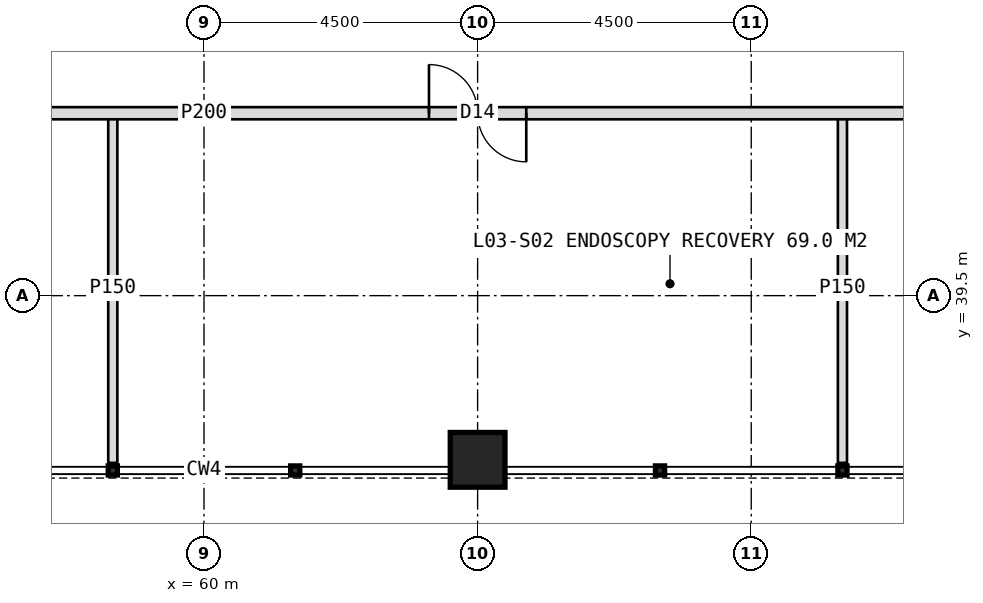
"""IFC4 building model, lengths in metres.
Left out: names, types, materials, properties, quantities, classifications, styles, units other than length and angle.
Written with IfcOpenShell. Run it as: python <this file> out.ifc"""

import sys

from ifc_helpers import new_model, si_unit, direction, frame, frame_2d, origin, origin_2d, place, context, subcontext, project, spatial, rectangle, hollow_rectangle, extrude, element, fill, save


model = new_model("IFC4")
c1 = context("Model", 3, precision=1e-05, world=origin(), true_north=direction((0.0, 1.0)))
c2 = subcontext(c1, "Body", "Model", "MODEL_VIEW")
j1 = project(units=[si_unit("LENGTHUNIT", "METRE"), si_unit("PLANEANGLEUNIT", "RADIAN")], contexts=[c1])
p1 = place(None, origin())
s1 = spatial("IfcSite", under=j1, at=p1, CompositionType="ELEMENT")
p2 = place(p1, origin())
s2 = spatial("IfcBuilding", under=s1, at=p2, CompositionType="ELEMENT")
p3 = place(p2, frame((0.0, 0.0, 16.5)))
s3 = spatial("IfcBuildingStorey", under=s2, at=p3, CompositionType="ELEMENT", Elevation=16.5)
p4 = place(p3, frame((64.5, 36.8, 0.0), z_axis=(0.0, 0.0, 1.0), x_axis=(1.0, 0.0, 0.0)))
e1 = element("IfcColumn", 1, at=p4, inside=s3, PredefinedType="COLUMN", context=c2, shape_type="SweptSolid", body=[
    extrude(hollow_rectangle(XDim=0.9, YDim=0.9, WallThickness=0.08, at=origin_2d()), origin(), (0.0, 0.0, 1.0), 4.5),
])
for number, where, z_axis, x_axis in (
    (2, (70.5, 42.5, 0.0), (0.0, 0.0, 1.0), (0.0, -1.0, 0.0)),
    (3, (58.5, 42.5, 0.0), (0.0, 0.0, 1.0), (0.0, -1.0, 0.0)),
):
    element("IfcWall", number, at=place(p3, frame(where, z_axis=z_axis, x_axis=x_axis)), inside=s3, PredefinedType="PARTITIONING", context=c2, shape_type="SweptSolid", body=[
        extrude(rectangle(XDim=5.75, YDim=0.15, at=frame_2d((2.875, 0.0))), origin(), (0.0, 0.0, 1.0), 4.2),
    ])
p5 = place(p3, frame((79.5, 42.5, 0.0), z_axis=(0.0, 0.0, 1.0), x_axis=(-1.0, 0.0, 0.0)))
e4 = element("IfcWall", 4, at=p5, inside=s3, PredefinedType="PARTITIONING", context=c2, shape_type="SweptSolid", body=[
    extrude(rectangle(XDim=39.0, YDim=0.2, at=frame_2d((19.5, 0.0))), origin(), (0.0, 0.0, 1.0), 4.2),
])
p6 = place(p5, frame((4.0, 0.0, 0.0)))
e5 = element("IfcOpeningElement", 5, at=p6, cuts=e4, PredefinedType="OPENING", context=c2, shape_type="SweptSolid", body=[
    extrude(rectangle(XDim=1.0, YDim=2.1, at=frame_2d((0.5, 1.05))), frame((0.0, 0.11, 0.0), z_axis=(0.0, -1.0, 0.0), x_axis=(1.0, 0.0, 0.0)), (0.0, 0.0, 1.0), 0.22),
])
p7 = place(p5, frame((14.2, 0.0, 0.0)))
e6 = element("IfcOpeningElement", 6, at=p7, cuts=e4, PredefinedType="OPENING", context=c2, shape_type="SweptSolid", body=[
    extrude(rectangle(XDim=1.6, YDim=2.2, at=frame_2d((0.8, 1.1))), frame((0.0, 0.11, 0.0), z_axis=(0.0, -1.0, 0.0), x_axis=(1.0, 0.0, 0.0)), (0.0, 0.0, 1.0), 0.22),
])
p8 = place(p5, frame((29.2, 0.0, 0.0)))
e7 = element("IfcOpeningElement", 7, at=p8, cuts=e4, PredefinedType="OPENING", context=c2, shape_type="SweptSolid", body=[
    extrude(rectangle(XDim=1.6, YDim=2.2, at=frame_2d((0.8, 1.1))), frame((0.0, 0.11, 0.0), z_axis=(0.0, -1.0, 0.0), x_axis=(1.0, 0.0, 0.0)), (0.0, 0.0, 1.0), 0.22),
])
p9 = place(p7, origin())
e8 = element("IfcDoor", 8, at=p9, inside=s3, OperationType="DOUBLE_DOOR_DOUBLE_SWING", PredefinedType="DOOR", context=c2, shape_type="SweptSolid", body=[
    extrude(rectangle(XDim=1.6, YDim=2.2, at=frame_2d((0.8, 1.1))), frame((0.0, 0.025, 0.0), z_axis=(0.0, -1.0, 0.0), x_axis=(1.0, 0.0, 0.0)), (0.0, 0.0, 1.0), 0.05),
])
fill(e6, e8)
save(model, sys.argv[1])
